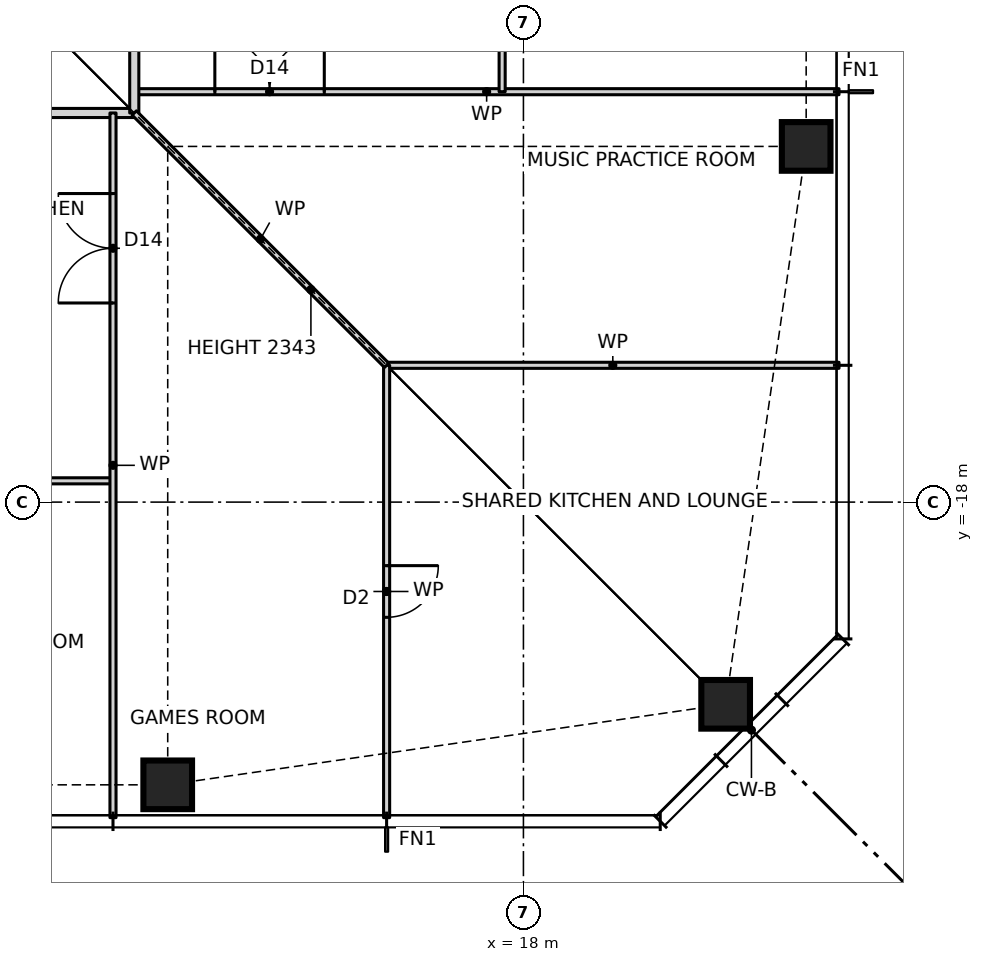
"""IFC4 building model, lengths in metres.
Left out: names, types, materials, properties, quantities, classifications, styles, units other than length and angle.
Written with IfcOpenShell. Run it as: python <this file> out.ifc"""

import sys

from ifc_helpers import new_model, si_unit, direction, frame, frame_2d, origin, origin_2d, place, context, subcontext, project, spatial, rectangle, hollow_rectangle, extrude, element, fill, save


model = new_model("IFC4")
c1 = context("Model", 3, precision=1e-05, world=origin(), true_north=direction((0.0, 1.0)))
c2 = subcontext(c1, "Body", "Model", "MODEL_VIEW")
j1 = project(units=[si_unit("LENGTHUNIT", "METRE"), si_unit("PLANEANGLEUNIT", "RADIAN")], contexts=[c1])
p1 = place(None, origin())
s1 = spatial("IfcSite", under=j1, at=p1, CompositionType="ELEMENT")
p2 = place(p1, origin())
s2 = spatial("IfcBuilding", under=s1, at=p2, CompositionType="ELEMENT")
p3 = place(p2, frame((0.0, 0.0, 36.0)))
s3 = spatial("IfcBuildingStorey", under=s2, at=p3, CompositionType="ELEMENT", Elevation=36.0)
for number, where, z_axis, x_axis in (
    (1, (12.15, -22.65, 0.0), (0.0, 0.0, 1.0), (1.0, 0.0, 0.0)),
    (2, (21.326, -21.326, 0.0), (0.0, 0.0, 1.0), (1.0, 0.0, 0.0)),
    (3, (22.65, -12.15, 0.0), (0.0, 0.0, 1.0), (1.0, 0.0, 0.0)),
):
    element("IfcColumn", number, at=place(p3, frame(where, z_axis=z_axis, x_axis=x_axis)), inside=s3, PredefinedType="COLUMN", context=c2, shape_type="SweptSolid", body=[
        extrude(hollow_rectangle(XDim=0.8, YDim=0.8, WallThickness=0.09, at=origin_2d()), origin(), (0.0, 0.0, 1.0), 3.5),
    ])
p4 = place(p3, frame((-15.75, -17.65, 0.0), z_axis=(0.0, 0.0, 1.0), x_axis=(1.0, 0.0, 0.0)))
e4 = element("IfcWall", 4, at=p4, inside=s3, PredefinedType="PARTITIONING", context=c2, shape_type="SweptSolid", body=[
    extrude(rectangle(XDim=27.0, YDim=0.1, at=frame_2d((13.5, 0.0))), origin(), (0.0, 0.0, 1.0), 3.0),
])
p5 = place(p4, frame((1.8, 0.0, 0.0)))
e5 = element("IfcOpeningElement", 5, at=p5, cuts=e4, PredefinedType="OPENING", context=c2, shape_type="SweptSolid", body=[
    extrude(rectangle(XDim=0.9, YDim=2.1, at=frame_2d((0.45, 1.05))), frame((0.0, 0.06, 0.0), z_axis=(0.0, -1.0, 0.0), x_axis=(1.0, 0.0, 0.0)), (0.0, 0.0, 1.0), 0.12),
])
p6 = place(p4, frame((6.3, 0.0, 0.0)))
e6 = element("IfcOpeningElement", 6, at=p6, cuts=e4, PredefinedType="OPENING", context=c2, shape_type="SweptSolid", body=[
    extrude(rectangle(XDim=0.9, YDim=2.1, at=frame_2d((0.45, 1.05))), frame((0.0, 0.06, 0.0), z_axis=(0.0, -1.0, 0.0), x_axis=(1.0, 0.0, 0.0)), (0.0, 0.0, 1.0), 0.12),
])
p7 = place(p4, frame((10.8, 0.0, 0.0)))
e7 = element("IfcOpeningElement", 7, at=p7, cuts=e4, PredefinedType="OPENING", context=c2, shape_type="SweptSolid", body=[
    extrude(rectangle(XDim=0.9, YDim=2.1, at=frame_2d((0.45, 1.05))), frame((0.0, 0.06, 0.0), z_axis=(0.0, -1.0, 0.0), x_axis=(1.0, 0.0, 0.0)), (0.0, 0.0, 1.0), 0.12),
])
p8 = place(p4, frame((15.3, 0.0, 0.0)))
e8 = element("IfcOpeningElement", 8, at=p8, cuts=e4, PredefinedType="OPENING", context=c2, shape_type="SweptSolid", body=[
    extrude(rectangle(XDim=0.9, YDim=2.1, at=frame_2d((0.45, 1.05))), frame((0.0, 0.06, 0.0), z_axis=(0.0, -1.0, 0.0), x_axis=(1.0, 0.0, 0.0)), (0.0, 0.0, 1.0), 0.12),
])
p9 = place(p4, frame((19.8, 0.0, 0.0)))
e9 = element("IfcOpeningElement", 9, at=p9, cuts=e4, PredefinedType="OPENING", context=c2, shape_type="SweptSolid", body=[
    extrude(rectangle(XDim=0.9, YDim=2.1, at=frame_2d((0.45, 1.05))), frame((0.0, 0.06, 0.0), z_axis=(0.0, -1.0, 0.0), x_axis=(1.0, 0.0, 0.0)), (0.0, 0.0, 1.0), 0.12),
])
p10 = place(p4, frame((24.3, 0.0, 0.0)))
e10 = element("IfcOpeningElement", 10, at=p10, cuts=e4, PredefinedType="OPENING", context=c2, shape_type="SweptSolid", body=[
    extrude(rectangle(XDim=0.9, YDim=2.1, at=frame_2d((0.45, 1.05))), frame((0.0, 0.06, 0.0), z_axis=(0.0, -1.0, 0.0), x_axis=(1.0, 0.0, 0.0)), (0.0, 0.0, 1.0), 0.12),
])
p11 = place(p3, frame((15.75, -15.75, 0.0), z_axis=(0.0, 0.0, 1.0), x_axis=(1.0, 0.0, 0.0)))
e11 = element("IfcWall", 11, at=p11, inside=s3, PredefinedType="PARTITIONING", context=c2, shape_type="SweptSolid", body=[
    extrude(rectangle(XDim=7.44, YDim=0.1, at=frame_2d((3.72, 0.0))), origin(), (0.0, 0.0, 1.0), 3.27),
])
p12 = place(p3, frame((-11.6, -11.6, 0.0), z_axis=(0.0, 0.0, 1.0), x_axis=(1.0, 0.0, 0.0)))
e12 = element("IfcWall", 12, at=p12, inside=s3, PredefinedType="PARTITIONING", context=c2, shape_type="SweptSolid", body=[
    extrude(rectangle(XDim=23.2, YDim=0.15, at=frame_2d((11.6, 0.0))), origin(), (0.0, 0.0, 1.0), 3.27),
])
p13 = place(p12, frame((2.975, 0.0, 0.0)))
e13 = element("IfcOpeningElement", 13, at=p13, cuts=e12, PredefinedType="OPENING", context=c2, shape_type="SweptSolid", body=[
    extrude(rectangle(XDim=1.0, YDim=2.1, at=frame_2d((0.5, 1.05))), frame((0.0, 0.085, 0.0), z_axis=(0.0, -1.0, 0.0), x_axis=(1.0, 0.0, 0.0)), (0.0, 0.0, 1.0), 0.17),
])
p14 = place(p12, frame((18.6, 0.0, 0.0)))
e14 = element("IfcOpeningElement", 14, at=p14, cuts=e12, PredefinedType="OPENING", context=c2, shape_type="SweptSolid", body=[
    extrude(rectangle(XDim=1.0, YDim=2.1, at=frame_2d((0.5, 1.05))), frame((0.0, 0.085, 0.0), z_axis=(0.0, -1.0, 0.0), x_axis=(1.0, 0.0, 0.0)), (0.0, 0.0, 1.0), 0.17),
])
p15 = place(p3, frame((11.6, -11.25, 0.0), z_axis=(0.0, 0.0, 1.0), x_axis=(1.0, 0.0, 0.0)))
e15 = element("IfcWall", 15, at=p15, inside=s3, PredefinedType="PARTITIONING", context=c2, shape_type="SweptSolid", body=[
    extrude(rectangle(XDim=11.59, YDim=0.1, at=frame_2d((5.795, 0.0))), origin(), (0.0, 0.0, 1.0), 3.27),
])
p16 = place(p15, frame((1.325, 0.0, 0.0)))
e16 = element("IfcOpeningElement", 16, at=p16, cuts=e15, PredefinedType="OPENING", context=c2, shape_type="SweptSolid", body=[
    extrude(rectangle(XDim=1.8, YDim=2.1, at=frame_2d((0.9, 1.05))), frame((0.0, 0.06, 0.0), z_axis=(0.0, -1.0, 0.0), x_axis=(1.0, 0.0, 0.0)), (0.0, 0.0, 1.0), 0.12),
])
p17 = place(p3, frame((17.65, -11.25, 0.0), z_axis=(0.0, 0.0, 1.0), x_axis=(0.0, 1.0, 0.0)))
e17 = element("IfcWall", 17, at=p17, inside=s3, PredefinedType="PARTITIONING", context=c2, shape_type="SweptSolid", body=[
    extrude(rectangle(XDim=27.0, YDim=0.1, at=frame_2d((13.5, 0.0))), origin(), (0.0, 0.0, 1.0), 3.0),
])
p18 = place(p17, frame((1.8, 0.0, 0.0)))
e18 = element("IfcOpeningElement", 18, at=p18, cuts=e17, PredefinedType="OPENING", context=c2, shape_type="SweptSolid", body=[
    extrude(rectangle(XDim=0.9, YDim=2.1, at=frame_2d((0.45, 1.05))), frame((0.0, 0.06, 0.0), z_axis=(0.0, -1.0, 0.0), x_axis=(1.0, 0.0, 0.0)), (0.0, 0.0, 1.0), 0.12),
])
p19 = place(p17, frame((6.3, 0.0, 0.0)))
e19 = element("IfcOpeningElement", 19, at=p19, cuts=e17, PredefinedType="OPENING", context=c2, shape_type="SweptSolid", body=[
    extrude(rectangle(XDim=0.9, YDim=2.1, at=frame_2d((0.45, 1.05))), frame((0.0, 0.06, 0.0), z_axis=(0.0, -1.0, 0.0), x_axis=(1.0, 0.0, 0.0)), (0.0, 0.0, 1.0), 0.12),
])
p20 = place(p17, frame((10.8, 0.0, 0.0)))
e20 = element("IfcOpeningElement", 20, at=p20, cuts=e17, PredefinedType="OPENING", context=c2, shape_type="SweptSolid", body=[
    extrude(rectangle(XDim=0.9, YDim=2.1, at=frame_2d((0.45, 1.05))), frame((0.0, 0.06, 0.0), z_axis=(0.0, -1.0, 0.0), x_axis=(1.0, 0.0, 0.0)), (0.0, 0.0, 1.0), 0.12),
])
p21 = place(p17, frame((15.3, 0.0, 0.0)))
e21 = element("IfcOpeningElement", 21, at=p21, cuts=e17, PredefinedType="OPENING", context=c2, shape_type="SweptSolid", body=[
    extrude(rectangle(XDim=0.9, YDim=2.1, at=frame_2d((0.45, 1.05))), frame((0.0, 0.06, 0.0), z_axis=(0.0, -1.0, 0.0), x_axis=(1.0, 0.0, 0.0)), (0.0, 0.0, 1.0), 0.12),
])
p22 = place(p17, frame((19.8, 0.0, 0.0)))
e22 = element("IfcOpeningElement", 22, at=p22, cuts=e17, PredefinedType="OPENING", context=c2, shape_type="SweptSolid", body=[
    extrude(rectangle(XDim=0.9, YDim=2.1, at=frame_2d((0.45, 1.05))), frame((0.0, 0.06, 0.0), z_axis=(0.0, -1.0, 0.0), x_axis=(1.0, 0.0, 0.0)), (0.0, 0.0, 1.0), 0.12),
])
p23 = place(p17, frame((24.3, 0.0, 0.0)))
e23 = element("IfcOpeningElement", 23, at=p23, cuts=e17, PredefinedType="OPENING", context=c2, shape_type="SweptSolid", body=[
    extrude(rectangle(XDim=0.9, YDim=2.1, at=frame_2d((0.45, 1.05))), frame((0.0, 0.06, 0.0), z_axis=(0.0, -1.0, 0.0), x_axis=(1.0, 0.0, 0.0)), (0.0, 0.0, 1.0), 0.12),
])
p24 = place(p3, frame((15.75, -23.19, 0.0), z_axis=(0.0, 0.0, 1.0), x_axis=(0.0, 1.0, 0.0)))
e24 = element("IfcWall", 24, at=p24, inside=s3, PredefinedType="PARTITIONING", context=c2, shape_type="SweptSolid", body=[
    extrude(rectangle(XDim=7.44, YDim=0.1, at=frame_2d((3.72, 0.0))), origin(), (0.0, 0.0, 1.0), 3.27),
])
p25 = place(p24, frame((3.295, 0.0, 0.0)))
e25 = element("IfcOpeningElement", 25, at=p25, cuts=e24, PredefinedType="OPENING", context=c2, shape_type="SweptSolid", body=[
    extrude(rectangle(XDim=0.85, YDim=2.1, at=frame_2d((0.425, 1.05))), frame((0.0, 0.06, 0.0), z_axis=(0.0, -1.0, 0.0), x_axis=(1.0, 0.0, 0.0)), (0.0, 0.0, 1.0), 0.12),
])
p26 = place(p3, frame((11.6, -11.6, 0.0), z_axis=(0.0, 0.0, 1.0), x_axis=(0.0, 1.0, 0.0)))
e26 = element("IfcWall", 26, at=p26, inside=s3, PredefinedType="PARTITIONING", context=c2, shape_type="SweptSolid", body=[
    extrude(rectangle(XDim=24.2, YDim=0.15, at=frame_2d((12.1, 0.0))), origin(), (0.0, 0.0, 1.0), 3.27),
])
p27 = place(p26, frame((3.6, 0.0, 0.0)))
e27 = element("IfcOpeningElement", 27, at=p27, cuts=e26, PredefinedType="OPENING", context=c2, shape_type="SweptSolid", body=[
    extrude(rectangle(XDim=1.0, YDim=2.1, at=frame_2d((0.5, 1.05))), frame((0.0, 0.085, 0.0), z_axis=(0.0, -1.0, 0.0), x_axis=(1.0, 0.0, 0.0)), (0.0, 0.0, 1.0), 0.17),
])
p28 = place(p26, frame((21.025, 0.0, 0.0)))
e28 = element("IfcOpeningElement", 28, at=p28, cuts=e26, PredefinedType="OPENING", context=c2, shape_type="SweptSolid", body=[
    extrude(rectangle(XDim=1.0, YDim=2.1, at=frame_2d((0.5, 1.05))), frame((0.0, 0.085, 0.0), z_axis=(0.0, -1.0, 0.0), x_axis=(1.0, 0.0, 0.0)), (0.0, 0.0, 1.0), 0.17),
])
p29 = place(p3, frame((11.25, -23.19, 0.0), z_axis=(0.0, 0.0, 1.0), x_axis=(0.0, 1.0, 0.0)))
e29 = element("IfcWall", 29, at=p29, inside=s3, PredefinedType="PARTITIONING", context=c2, shape_type="SweptSolid", body=[
    extrude(rectangle(XDim=11.59, YDim=0.1, at=frame_2d((5.795, 0.0))), origin(), (0.0, 0.0, 1.0), 3.27),
])
p30 = place(p29, frame((8.465, 0.0, 0.0)))
e30 = element("IfcOpeningElement", 30, at=p30, cuts=e29, PredefinedType="OPENING", context=c2, shape_type="SweptSolid", body=[
    extrude(rectangle(XDim=1.8, YDim=2.1, at=frame_2d((0.9, 1.05))), frame((0.0, 0.06, 0.0), z_axis=(0.0, -1.0, 0.0), x_axis=(1.0, 0.0, 0.0)), (0.0, 0.0, 1.0), 0.12),
])
p31 = place(p3, frame((15.75, -15.75, 0.0), z_axis=(0.0, 0.0, 1.0), x_axis=(-0.707106781187, 0.707106781187, 0.0)))
e31 = element("IfcWall", 31, at=p31, inside=s3, PredefinedType="PARTITIONING", context=c2, shape_type="SweptSolid", body=[
    extrude(rectangle(XDim=5.869, YDim=0.1, at=frame_2d((2.935, 0.0))), origin(), (0.0, 0.0, 1.0), 2.343),
])
p32 = place(p30, origin())
e32 = element("IfcDoor", 32, at=p32, inside=s3, OperationType="DOUBLE_DOOR_SINGLE_SWING", PredefinedType="DOOR", context=c2, shape_type="SweptSolid", body=[
    extrude(rectangle(XDim=1.8, YDim=2.1, at=frame_2d((0.9, 1.05))), frame((0.0, 0.025, 0.0), z_axis=(0.0, -1.0, 0.0), x_axis=(1.0, 0.0, 0.0)), (0.0, 0.0, 1.0), 0.05),
])
fill(e30, e32)
p33 = place(p16, origin())
e33 = element("IfcDoor", 33, at=p33, inside=s3, OperationType="DOUBLE_DOOR_SINGLE_SWING", PredefinedType="DOOR", context=c2, shape_type="SweptSolid", body=[
    extrude(rectangle(XDim=1.8, YDim=2.1, at=frame_2d((0.9, 1.05))), frame((0.0, 0.025, 0.0), z_axis=(0.0, -1.0, 0.0), x_axis=(1.0, 0.0, 0.0)), (0.0, 0.0, 1.0), 0.05),
])
fill(e16, e33)
p34 = place(p25, frame((0.85, 0.0, 0.0), z_axis=(0.0, 0.0, 1.0), x_axis=(-1.0, 0.0, 0.0)))
e34 = element("IfcDoor", 34, at=p34, inside=s3, OperationType="SINGLE_SWING_LEFT", PredefinedType="DOOR", context=c2, shape_type="SweptSolid", body=[
    extrude(rectangle(XDim=0.85, YDim=2.1, at=frame_2d((0.425, 1.05))), frame((0.0, 0.025, 0.0), z_axis=(0.0, -1.0, 0.0), x_axis=(1.0, 0.0, 0.0)), (0.0, 0.0, 1.0), 0.05),
])
fill(e25, e34)
save(model, sys.argv[1])
